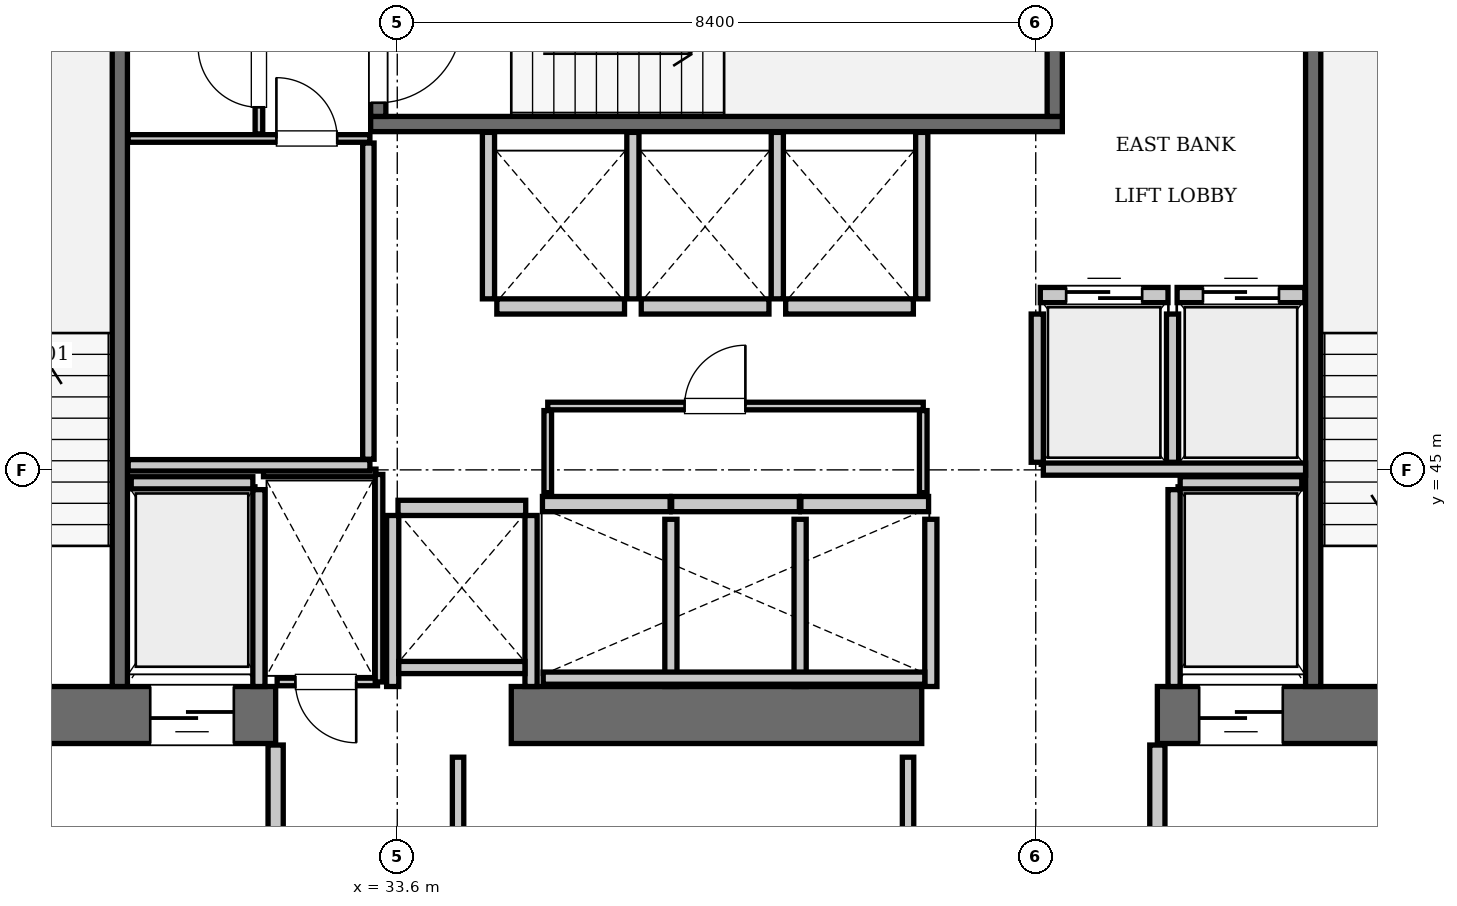
"""IFC4 building model, lengths in metres.
Left out: names, types, materials, properties, quantities, classifications, styles, units other than length and angle.
Written with IfcOpenShell. Run it as: python <this file> out.ifc"""

import sys

from ifc_helpers import new_model, si_unit, direction, frame, frame_2d, origin, place, context, subcontext, project, spatial, rectangle, extrude, element, fill, save


model = new_model("IFC4")
c1 = context("Model", 3, precision=1e-05, world=origin(), true_north=direction((0.0, 1.0)))
c2 = subcontext(c1, "Body", "Model", "MODEL_VIEW")
j1 = project(units=[si_unit("LENGTHUNIT", "METRE"), si_unit("PLANEANGLEUNIT", "RADIAN")], contexts=[c1])
p1 = place(None, origin())
s1 = spatial("IfcSite", under=j1, at=p1, CompositionType="ELEMENT")
p2 = place(p1, origin())
s2 = spatial("IfcBuilding", under=s1, at=p2, CompositionType="ELEMENT")
p3 = place(p2, frame((0.0, 0.0, 219.8)))
s3 = spatial("IfcBuildingStorey", under=s2, at=p3, CompositionType="ELEMENT", Elevation=219.8)
p4 = place(p3, frame((25.2, 41.775, 0.0), z_axis=(0.0, 0.0, 1.0), x_axis=(1.0, 0.0, 0.0)))
e1 = element("IfcWall", 1, at=p4, inside=s3, PredefinedType="SHEAR", context=c2, shape_type="SweptSolid", body=[
    extrude(rectangle(XDim=6.8, YDim=0.75, at=frame_2d((3.4, 0.0))), origin(), (0.0, 0.0, 1.0), 3.85),
])
p5 = place(p4, frame((1.65, 0.0, 0.0)))
e2 = element("IfcOpeningElement", 2, at=p5, cuts=e1, PredefinedType="OPENING", context=c2, shape_type="SweptSolid", body=[
    extrude(rectangle(XDim=1.15, YDim=2.15, at=frame_2d((0.575, 1.075))), frame((0.0, 0.385, 0.0), z_axis=(0.0, -1.0, 0.0), x_axis=(1.0, 0.0, 0.0)), (0.0, 0.0, 1.0), 0.77),
])
p6 = place(p4, frame((5.15, 0.0, 0.0)))
e3 = element("IfcOpeningElement", 3, at=p6, cuts=e1, PredefinedType="OPENING", context=c2, shape_type="SweptSolid", body=[
    extrude(rectangle(XDim=1.1, YDim=2.2, at=frame_2d((0.55, 1.1))), frame((0.0, 0.385, 0.0), z_axis=(0.0, -1.0, 0.0), x_axis=(1.0, 0.0, 0.0)), (0.0, 0.0, 1.0), 0.77),
])
p7 = place(p3, frame((35.1, 41.775, 0.0), z_axis=(0.0, 0.0, 1.0), x_axis=(1.0, 0.0, 0.0)))
e4 = element("IfcWall", 4, at=p7, inside=s3, PredefinedType="SHEAR", context=c2, shape_type="SweptSolid", body=[
    extrude(rectangle(XDim=5.4, YDim=0.75, at=frame_2d((2.7, 0.0))), origin(), (0.0, 0.0, 1.0), 3.85),
])
p8 = place(p3, frame((43.6, 41.775, 0.0), z_axis=(0.0, 0.0, 1.0), x_axis=(1.0, 0.0, 0.0)))
e5 = element("IfcWall", 5, at=p8, inside=s3, PredefinedType="SHEAR", context=c2, shape_type="SweptSolid", body=[
    extrude(rectangle(XDim=6.8, YDim=0.75, at=frame_2d((3.4, 0.0))), origin(), (0.0, 0.0, 1.0), 3.85),
])
p9 = place(p8, frame((3.9, 0.0, 0.0)))
e6 = element("IfcOpeningElement", 6, at=p9, cuts=e5, PredefinedType="OPENING", context=c2, shape_type="SweptSolid", body=[
    extrude(rectangle(XDim=1.15, YDim=2.15, at=frame_2d((0.575, 1.075))), frame((0.0, 0.385, 0.0), z_axis=(0.0, -1.0, 0.0), x_axis=(1.0, 0.0, 0.0)), (0.0, 0.0, 1.0), 0.77),
])
p10 = place(p8, frame((0.55, 0.0, 0.0)))
e7 = element("IfcOpeningElement", 7, at=p10, cuts=e5, PredefinedType="OPENING", context=c2, shape_type="SweptSolid", body=[
    extrude(rectangle(XDim=1.1, YDim=2.2, at=frame_2d((0.55, 1.1))), frame((0.0, 0.385, 0.0), z_axis=(0.0, -1.0, 0.0), x_axis=(1.0, 0.0, 0.0)), (0.0, 0.0, 1.0), 0.77),
])
p11 = place(p3, frame((29.95, 42.15, 0.0), z_axis=(0.0, 0.0, 1.0), x_axis=(0.0, 1.0, 0.0)))
e8 = element("IfcWall", 8, at=p11, inside=s3, PredefinedType="SOLIDWALL", context=c2, shape_type="SweptSolid", body=[
    extrude(rectangle(XDim=9.0, YDim=0.2, at=frame_2d((4.5, 0.0))), origin(), (0.0, 0.0, 1.0), 3.61),
])
p12 = place(p3, frame((33.25, 49.55, 0.0), z_axis=(0.0, 0.0, 1.0), x_axis=(1.0, 0.0, 0.0)))
e9 = element("IfcWall", 9, at=p12, inside=s3, PredefinedType="SOLIDWALL", context=c2, shape_type="SweptSolid", body=[
    extrude(rectangle(XDim=9.1, YDim=0.2, at=frame_2d((4.55, 0.0))), origin(), (0.0, 0.0, 1.0), 3.61),
])
p13 = place(p3, frame((42.25, 49.65, 0.0), z_axis=(0.0, 0.0, 1.0), x_axis=(0.0, 1.0, 0.0)))
e10 = element("IfcWall", 10, at=p13, inside=s3, PredefinedType="SOLIDWALL", context=c2, shape_type="SweptSolid", body=[
    extrude(rectangle(XDim=3.6, YDim=0.2, at=frame_2d((1.8, 0.0))), origin(), (0.0, 0.0, 1.0), 3.61),
])
p14 = place(p3, frame((33.35, 49.65, 0.0), z_axis=(0.0, 0.0, 1.0), x_axis=(0.0, 1.0, 0.0)))
e11 = element("IfcWall", 11, at=p14, inside=s3, PredefinedType="SOLIDWALL", context=c2, shape_type="SweptSolid", body=[
    extrude(rectangle(XDim=3.6, YDim=0.2, at=frame_2d((1.8, 0.0))), origin(), (0.0, 0.0, 1.0), 3.61),
])
p15 = place(p14, frame((0.18, 0.0, 0.0)))
e12 = element("IfcOpeningElement", 12, at=p15, cuts=e11, PredefinedType="OPENING", context=c2, shape_type="SweptSolid", body=[
    extrude(rectangle(XDim=1.1, YDim=2.15, at=frame_2d((0.55, 1.075))), frame((0.0, 0.11, 0.0), z_axis=(0.0, -1.0, 0.0), x_axis=(1.0, 0.0, 0.0)), (0.0, 0.0, 1.0), 0.22),
])
p16 = place(p3, frame((45.65, 42.15, 0.0), z_axis=(0.0, 0.0, 1.0), x_axis=(0.0, 1.0, 0.0)))
e13 = element("IfcWall", 13, at=p16, inside=s3, PredefinedType="SOLIDWALL", context=c2, shape_type="SweptSolid", body=[
    extrude(rectangle(XDim=9.0, YDim=0.2, at=frame_2d((4.5, 0.0))), origin(), (0.0, 0.0, 1.0), 3.61),
])
p17 = place(p3, frame((42.06, 47.3, 0.0), z_axis=(0.0, 0.0, 1.0), x_axis=(1.0, 0.0, 0.0)))
e14 = element("IfcWall", 14, at=p17, inside=s3, PredefinedType="SOLIDWALL", context=c2, shape_type="SweptSolid", body=[
    extrude(rectangle(XDim=1.68, YDim=0.2, at=frame_2d((0.84, 0.0))), origin(), (0.0, 0.0, 1.0), 3.61),
])
p18 = place(p17, frame((0.34, 0.0, 0.0)))
e15 = element("IfcOpeningElement", 15, at=p18, cuts=e14, PredefinedType="OPENING", context=c2, shape_type="SweptSolid", body=[
    extrude(rectangle(XDim=1.0, YDim=2.15, at=frame_2d((0.5, 1.075))), frame((0.0, 0.11, 0.0), z_axis=(0.0, -1.0, 0.0), x_axis=(1.0, 0.0, 0.0)), (0.0, 0.0, 1.0), 0.22),
])
p19 = place(p3, frame((43.86, 47.3, 0.0), z_axis=(0.0, 0.0, 1.0), x_axis=(1.0, 0.0, 0.0)))
e16 = element("IfcWall", 16, at=p19, inside=s3, PredefinedType="SOLIDWALL", context=c2, shape_type="SweptSolid", body=[
    extrude(rectangle(XDim=1.68, YDim=0.2, at=frame_2d((0.84, 0.0))), origin(), (0.0, 0.0, 1.0), 3.61),
])
p20 = place(p19, frame((0.34, 0.0, 0.0)))
e17 = element("IfcOpeningElement", 17, at=p20, cuts=e16, PredefinedType="OPENING", context=c2, shape_type="SweptSolid", body=[
    extrude(rectangle(XDim=1.0, YDim=2.15, at=frame_2d((0.5, 1.075))), frame((0.0, 0.11, 0.0), z_axis=(0.0, -1.0, 0.0), x_axis=(1.0, 0.0, 0.0)), (0.0, 0.0, 1.0), 0.22),
])
for number, where, z_axis, x_axis in (
    (18, (35.51, 44.55, 0.0), (0.0, 0.0, 1.0), (1.0, 0.0, 0.0)),
    (19, (37.21, 44.55, 0.0), (0.0, 0.0, 1.0), (1.0, 0.0, 0.0)),
):
    element("IfcWall", number, at=place(p3, frame(where, z_axis=z_axis, x_axis=x_axis)), inside=s3, PredefinedType="SOLIDWALL", context=c2, shape_type="SweptSolid", body=[
        extrude(rectangle(XDim=1.68, YDim=0.2, at=frame_2d((0.84, 0.0))), origin(), (0.0, 0.0, 1.0), 3.61),
    ])
for number, where, z_axis, x_axis in (
    (20, (38.91, 44.55, 0.0), (0.0, 0.0, 1.0), (1.0, 0.0, 0.0)),
    (21, (34.91, 47.15, 0.0), (0.0, 0.0, 1.0), (1.0, 0.0, 0.0)),
):
    element("IfcWall", number, at=place(p3, frame(where, z_axis=z_axis, x_axis=x_axis)), inside=s3, PredefinedType="SOLIDWALL", context=c2, shape_type="SweptSolid", body=[
        extrude(rectangle(XDim=1.68, YDim=0.2, at=frame_2d((0.84, 0.0))), origin(), (0.0, 0.0, 1.0), 3.61),
    ])
for number, where, z_axis, x_axis in (
    (22, (36.81, 47.15, 0.0), (0.0, 0.0, 1.0), (1.0, 0.0, 0.0)),
    (23, (38.71, 47.15, 0.0), (0.0, 0.0, 1.0), (1.0, 0.0, 0.0)),
    (24, (33.61, 44.5, 0.0), (0.0, 0.0, 1.0), (1.0, 0.0, 0.0)),
):
    element("IfcWall", number, at=place(p3, frame(where, z_axis=z_axis, x_axis=x_axis)), inside=s3, PredefinedType="SOLIDWALL", context=c2, shape_type="SweptSolid", body=[
        extrude(rectangle(XDim=1.68, YDim=0.2, at=frame_2d((0.84, 0.0))), origin(), (0.0, 0.0, 1.0), 3.61),
    ])
p21 = place(p3, frame((30.1, 44.83, 0.0), z_axis=(0.0, 0.0, 1.0), x_axis=(1.0, 0.0, 0.0)))
e25 = element("IfcWall", 25, at=p21, inside=s3, PredefinedType="SOLIDWALL", context=c2, shape_type="SweptSolid", body=[
    extrude(rectangle(XDim=1.6, YDim=0.16, at=frame_2d((0.8, 0.0))), origin(), (0.0, 0.0, 1.0), 3.61),
])
p22 = place(p3, frame((31.78, 42.15, 0.0), z_axis=(0.0, 0.0, 1.0), x_axis=(0.0, 1.0, 0.0)))
e26 = element("IfcWall", 26, at=p22, inside=s3, PredefinedType="SOLIDWALL", context=c2, shape_type="SweptSolid", body=[
    extrude(rectangle(XDim=2.59, YDim=0.16, at=frame_2d((1.295, 0.0))), origin(), (0.0, 0.0, 1.0), 3.61),
])
p23 = place(p3, frame((43.9, 44.83, 0.0), z_axis=(0.0, 0.0, 1.0), x_axis=(1.0, 0.0, 0.0)))
e27 = element("IfcWall", 27, at=p23, inside=s3, PredefinedType="SOLIDWALL", context=c2, shape_type="SweptSolid", body=[
    extrude(rectangle(XDim=1.6, YDim=0.16, at=frame_2d((0.8, 0.0))), origin(), (0.0, 0.0, 1.0), 3.61),
])
p24 = place(p3, frame((43.82, 42.15, 0.0), z_axis=(0.0, 0.0, 1.0), x_axis=(0.0, 1.0, 0.0)))
e28 = element("IfcWall", 28, at=p24, inside=s3, PredefinedType="SOLIDWALL", context=c2, shape_type="SweptSolid", body=[
    extrude(rectangle(XDim=2.59, YDim=0.16, at=frame_2d((1.295, 0.0))), origin(), (0.0, 0.0, 1.0), 3.61),
])
for number, where, z_axis, x_axis in (
    (29, (42.02, 45.1, 0.0), (0.0, 0.0, 1.0), (0.0, 1.0, 0.0)),
    (30, (43.8, 45.1, 0.0), (0.0, 0.0, 1.0), (0.0, 1.0, 0.0)),
):
    element("IfcWall", number, at=place(p3, frame(where, z_axis=z_axis, x_axis=x_axis)), inside=s3, PredefinedType="SOLIDWALL", context=c2, shape_type="SweptSolid", body=[
        extrude(rectangle(XDim=1.95, YDim=0.16, at=frame_2d((0.975, 0.0))), origin(), (0.0, 0.0, 1.0), 3.61),
    ])
p25 = place(p3, frame((42.1, 45.01, 0.0), z_axis=(0.0, 0.0, 1.0), x_axis=(1.0, 0.0, 0.0)))
e31 = element("IfcWall", 31, at=p25, inside=s3, PredefinedType="SOLIDWALL", context=c2, shape_type="SweptSolid", body=[
    extrude(rectangle(XDim=3.45, YDim=0.16, at=frame_2d((1.725, 0.0))), origin(), (0.0, 0.0, 1.0), 3.61),
])
for number, where, z_axis, x_axis in (
    (32, (37.2, 42.15, 0.0), (0.0, 0.0, 1.0), (0.0, 1.0, 0.0)),
    (33, (38.9, 42.15, 0.0), (0.0, 0.0, 1.0), (0.0, 1.0, 0.0)),
    (34, (40.62, 42.15, 0.0), (0.0, 0.0, 1.0), (0.0, 1.0, 0.0)),
):
    element("IfcWall", number, at=place(p3, frame(where, z_axis=z_axis, x_axis=x_axis)), inside=s3, PredefinedType="SOLIDWALL", context=c2, shape_type="SweptSolid", body=[
        extrude(rectangle(XDim=2.2, YDim=0.16, at=frame_2d((1.1, 0.0))), origin(), (0.0, 0.0, 1.0), 3.61),
    ])
p26 = place(p3, frame((35.52, 42.26, 0.0), z_axis=(0.0, 0.0, 1.0), x_axis=(1.0, 0.0, 0.0)))
e35 = element("IfcWall", 35, at=p26, inside=s3, PredefinedType="SOLIDWALL", context=c2, shape_type="SweptSolid", body=[
    extrude(rectangle(XDim=5.02, YDim=0.16, at=frame_2d((2.51, 0.0))), origin(), (0.0, 0.0, 1.0), 3.61),
])
for number, where, z_axis, x_axis in (
    (36, (34.8, 47.25, 0.0), (0.0, 0.0, 1.0), (0.0, 1.0, 0.0)),
    (37, (36.7, 47.25, 0.0), (0.0, 0.0, 1.0), (0.0, 1.0, 0.0)),
    (38, (38.6, 47.25, 0.0), (0.0, 0.0, 1.0), (0.0, 1.0, 0.0)),
    (39, (40.5, 47.25, 0.0), (0.0, 0.0, 1.0), (0.0, 1.0, 0.0)),
):
    element("IfcWall", number, at=place(p3, frame(where, z_axis=z_axis, x_axis=x_axis)), inside=s3, PredefinedType="SOLIDWALL", context=c2, shape_type="SweptSolid", body=[
        extrude(rectangle(XDim=2.19, YDim=0.16, at=frame_2d((1.095, 0.0))), origin(), (0.0, 0.0, 1.0), 3.61),
    ])
for number, where, z_axis, x_axis in (
    (40, (33.54, 42.15, 0.0), (0.0, 0.0, 1.0), (0.0, 1.0, 0.0)),
    (41, (35.36, 42.15, 0.0), (0.0, 0.0, 1.0), (0.0, 1.0, 0.0)),
):
    element("IfcWall", number, at=place(p3, frame(where, z_axis=z_axis, x_axis=x_axis)), inside=s3, PredefinedType="SOLIDWALL", context=c2, shape_type="SweptSolid", body=[
        extrude(rectangle(XDim=2.25, YDim=0.16, at=frame_2d((1.125, 0.0))), origin(), (0.0, 0.0, 1.0), 3.61),
    ])
p27 = place(p3, frame((33.62, 42.4, 0.0), z_axis=(0.0, 0.0, 1.0), x_axis=(1.0, 0.0, 0.0)))
e42 = element("IfcWall", 42, at=p27, inside=s3, PredefinedType="SOLIDWALL", context=c2, shape_type="SweptSolid", body=[
    extrude(rectangle(XDim=1.66, YDim=0.16, at=frame_2d((0.83, 0.0))), origin(), (0.0, 0.0, 1.0), 3.61),
])
for number, where, z_axis, x_axis in (
    (43, (32.0, 38.31, 0.0), (0.0, 0.0, 1.0), (0.0, 1.0, 0.0)),
    (44, (43.6, 38.31, 0.0), (0.0, 0.0, 1.0), (0.0, 1.0, 0.0)),
):
    element("IfcWall", number, at=place(p3, frame(where, z_axis=z_axis, x_axis=x_axis)), inside=s3, PredefinedType="PARTITIONING", context=c2, shape_type="SweptSolid", body=[
        extrude(rectangle(XDim=3.07, YDim=0.2, at=frame_2d((1.535, 0.0))), origin(), (0.0, 0.0, 1.0), 3.61),
    ])
p28 = place(p3, frame((32.02, 42.21, 0.0), z_axis=(0.0, 0.0, 1.0), x_axis=(1.0, 0.0, 0.0)))
e45 = element("IfcWall", 45, at=p28, inside=s3, PredefinedType="PARTITIONING", context=c2, shape_type="SweptSolid", body=[
    extrude(rectangle(XDim=1.32, YDim=0.1, at=frame_2d((0.66, 0.0))), origin(), (0.0, 0.0, 1.0), 3.61),
])
p29 = place(p28, frame((0.24, 0.0, 0.0)))
e46 = element("IfcOpeningElement", 46, at=p29, cuts=e45, PredefinedType="OPENING", context=c2, shape_type="SweptSolid", body=[
    extrude(rectangle(XDim=0.8, YDim=2.05, at=frame_2d((0.4, 1.025))), frame((0.0, 0.06, 0.0), z_axis=(0.0, -1.0, 0.0), x_axis=(1.0, 0.0, 0.0)), (0.0, 0.0, 1.0), 0.12),
])
p30 = place(p3, frame((31.84, 44.96, 0.0), z_axis=(0.0, 0.0, 1.0), x_axis=(1.0, 0.0, 0.0)))
e47 = element("IfcWall", 47, at=p30, inside=s3, PredefinedType="PARTITIONING", context=c2, shape_type="SweptSolid", body=[
    extrude(rectangle(XDim=1.48, YDim=0.1, at=frame_2d((0.74, 0.0))), origin(), (0.0, 0.0, 1.0), 3.61),
])
p31 = place(p3, frame((33.36, 42.21, 0.0), z_axis=(0.0, 0.0, 1.0), x_axis=(0.0, 1.0, 0.0)))
e48 = element("IfcWall", 48, at=p31, inside=s3, PredefinedType="PARTITIONING", context=c2, shape_type="SweptSolid", body=[
    extrude(rectangle(XDim=2.73, YDim=0.1, at=frame_2d((1.365, 0.0))), origin(), (0.0, 0.0, 1.0), 3.61),
])
p32 = place(p3, frame((35.58, 45.84, 0.0), z_axis=(0.0, 0.0, 1.0), x_axis=(1.0, 0.0, 0.0)))
e49 = element("IfcWall", 49, at=p32, inside=s3, PredefinedType="PARTITIONING", context=c2, shape_type="SweptSolid", body=[
    extrude(rectangle(XDim=4.94, YDim=0.1, at=frame_2d((2.47, 0.0))), origin(), (0.0, 0.0, 1.0), 3.61),
])
p33 = place(p32, frame((1.8, 0.0, 0.0)))
e50 = element("IfcOpeningElement", 50, at=p33, cuts=e49, PredefinedType="OPENING", context=c2, shape_type="SweptSolid", body=[
    extrude(rectangle(XDim=0.8, YDim=2.05, at=frame_2d((0.4, 1.025))), frame((0.0, 0.06, 0.0), z_axis=(0.0, -1.0, 0.0), x_axis=(1.0, 0.0, 0.0)), (0.0, 0.0, 1.0), 0.12),
])
for number, where, z_axis, x_axis in (
    (51, (35.58, 44.7, 0.0), (0.0, 0.0, 1.0), (0.0, 1.0, 0.0)),
    (52, (40.52, 44.7, 0.0), (0.0, 0.0, 1.0), (0.0, 1.0, 0.0)),
):
    element("IfcWall", number, at=place(p3, frame(where, z_axis=z_axis, x_axis=x_axis)), inside=s3, PredefinedType="PARTITIONING", context=c2, shape_type="SweptSolid", body=[
        extrude(rectangle(XDim=1.08, YDim=0.1, at=frame_2d((0.54, 0.0))), origin(), (0.0, 0.0, 1.0), 3.61),
    ])
p34 = place(p3, frame((30.06, 45.06, 0.0), z_axis=(0.0, 0.0, 1.0), x_axis=(1.0, 0.0, 0.0)))
e53 = element("IfcWall", 53, at=p34, inside=s3, PredefinedType="PARTITIONING", context=c2, shape_type="SweptSolid", body=[
    extrude(rectangle(XDim=3.18, YDim=0.15, at=frame_2d((1.59, 0.0))), origin(), (0.0, 0.0, 1.0), 3.61),
])
p35 = place(p3, frame((33.22, 45.14, 0.0), z_axis=(0.0, 0.0, 1.0), x_axis=(0.0, 1.0, 0.0)))
e54 = element("IfcWall", 54, at=p35, inside=s3, PredefinedType="PARTITIONING", context=c2, shape_type="SweptSolid", body=[
    extrude(rectangle(XDim=4.16, YDim=0.15, at=frame_2d((2.08, 0.0))), origin(), (0.0, 0.0, 1.0), 3.61),
])
p36 = place(p3, frame((30.06, 49.36, 0.0), z_axis=(0.0, 0.0, 1.0), x_axis=(1.0, 0.0, 0.0)))
e55 = element("IfcWall", 55, at=p36, inside=s3, PredefinedType="PARTITIONING", context=c2, shape_type="SweptSolid", body=[
    extrude(rectangle(XDim=3.18, YDim=0.1, at=frame_2d((1.59, 0.0))), origin(), (0.0, 0.0, 1.0), 3.61),
])
p37 = place(p36, frame((1.95, 0.0, 0.0)))
e56 = element("IfcOpeningElement", 56, at=p37, cuts=e55, PredefinedType="OPENING", context=c2, shape_type="SweptSolid", body=[
    extrude(rectangle(XDim=0.8, YDim=2.05, at=frame_2d((0.4, 1.025))), frame((0.0, 0.06, 0.0), z_axis=(0.0, -1.0, 0.0), x_axis=(1.0, 0.0, 0.0)), (0.0, 0.0, 1.0), 0.12),
])
p38 = place(p3, frame((31.78, 49.42, 0.0), z_axis=(0.0, 0.0, 1.0), x_axis=(0.0, 1.0, 0.0)))
e57 = element("IfcWall", 57, at=p38, inside=s3, PredefinedType="PARTITIONING", context=c2, shape_type="SweptSolid", body=[
    extrude(rectangle(XDim=1.68, YDim=0.1, at=frame_2d((0.84, 0.0))), origin(), (0.0, 0.0, 1.0), 3.61),
])
p39 = place(p38, frame((0.35, 0.0, 0.0)))
e58 = element("IfcOpeningElement", 58, at=p39, cuts=e57, PredefinedType="OPENING", context=c2, shape_type="SweptSolid", body=[
    extrude(rectangle(XDim=0.8, YDim=2.05, at=frame_2d((0.4, 1.025))), frame((0.0, 0.06, 0.0), z_axis=(0.0, -1.0, 0.0), x_axis=(1.0, 0.0, 0.0)), (0.0, 0.0, 1.0), 0.12),
])
for number, where, z_axis, x_axis in (
    (59, (34.4, 38.38, 0.0), (0.0, 0.0, 1.0), (0.0, 1.0, 0.0)),
    (60, (40.32, 38.38, 0.0), (0.0, 0.0, 1.0), (0.0, 1.0, 0.0)),
):
    element("IfcWall", number, at=place(p3, frame(where, z_axis=z_axis, x_axis=x_axis)), inside=s3, PredefinedType="PARTITIONING", context=c2, shape_type="SweptSolid", body=[
        extrude(rectangle(XDim=2.84, YDim=0.15, at=frame_2d((1.42, 0.0))), origin(), (0.0, 0.0, 1.0), 3.61),
    ])
p40 = place(p15, frame((1.1, 0.0, 0.0), z_axis=(0.0, 0.0, 1.0), x_axis=(-1.0, 0.0, 0.0)))
e61 = element("IfcDoor", 61, at=p40, inside=s3, OperationType="SINGLE_SWING_LEFT", PredefinedType="DOOR", context=c2, shape_type="SweptSolid", body=[
    extrude(rectangle(XDim=1.1, YDim=2.15, at=frame_2d((0.55, 1.075))), frame((0.0, 0.025, 0.0), z_axis=(0.0, -1.0, 0.0), x_axis=(1.0, 0.0, 0.0)), (0.0, 0.0, 1.0), 0.05),
])
fill(e12, e61)
p41 = place(p18, origin())
e62 = element("IfcDoor", 62, at=p41, inside=s3, OperationType="SLIDING_TO_LEFT", PredefinedType="DOOR", context=c2, shape_type="SweptSolid", body=[
    extrude(rectangle(XDim=1.0, YDim=2.15, at=frame_2d((0.5, 1.075))), frame((0.0, 0.025, 0.0), z_axis=(0.0, -1.0, 0.0), x_axis=(1.0, 0.0, 0.0)), (0.0, 0.0, 1.0), 0.05),
])
fill(e15, e62)
p42 = place(p20, origin())
e63 = element("IfcDoor", 63, at=p42, inside=s3, OperationType="SLIDING_TO_LEFT", PredefinedType="DOOR", context=c2, shape_type="SweptSolid", body=[
    extrude(rectangle(XDim=1.0, YDim=2.15, at=frame_2d((0.5, 1.075))), frame((0.0, 0.025, 0.0), z_axis=(0.0, -1.0, 0.0), x_axis=(1.0, 0.0, 0.0)), (0.0, 0.0, 1.0), 0.05),
])
fill(e17, e63)
p43 = place(p6, frame((1.1, 0.0, 0.0), z_axis=(0.0, 0.0, 1.0), x_axis=(-1.0, 0.0, 0.0)))
e64 = element("IfcDoor", 64, at=p43, inside=s3, OperationType="SLIDING_TO_LEFT", PredefinedType="DOOR", context=c2, shape_type="SweptSolid", body=[
    extrude(rectangle(XDim=1.1, YDim=2.2, at=frame_2d((0.55, 1.1))), frame((0.0, 0.025, 0.0), z_axis=(0.0, -1.0, 0.0), x_axis=(1.0, 0.0, 0.0)), (0.0, 0.0, 1.0), 0.05),
])
fill(e3, e64)
p44 = place(p10, frame((1.1, 0.0, 0.0), z_axis=(0.0, 0.0, 1.0), x_axis=(-1.0, 0.0, 0.0)))
e65 = element("IfcDoor", 65, at=p44, inside=s3, OperationType="SLIDING_TO_LEFT", PredefinedType="DOOR", context=c2, shape_type="SweptSolid", body=[
    extrude(rectangle(XDim=1.1, YDim=2.2, at=frame_2d((0.55, 1.1))), frame((0.0, 0.025, 0.0), z_axis=(0.0, -1.0, 0.0), x_axis=(1.0, 0.0, 0.0)), (0.0, 0.0, 1.0), 0.05),
])
fill(e7, e65)
p45 = place(p29, frame((0.8, 0.0, 0.0), z_axis=(0.0, 0.0, 1.0), x_axis=(-1.0, 0.0, 0.0)))
e66 = element("IfcDoor", 66, at=p45, inside=s3, OperationType="SINGLE_SWING_LEFT", PredefinedType="DOOR", context=c2, shape_type="SweptSolid", body=[
    extrude(rectangle(XDim=0.8, YDim=2.05, at=frame_2d((0.4, 1.025))), frame((0.0, 0.025, 0.0), z_axis=(0.0, -1.0, 0.0), x_axis=(1.0, 0.0, 0.0)), (0.0, 0.0, 1.0), 0.05),
])
fill(e46, e66)
p46 = place(p33, origin())
e67 = element("IfcDoor", 67, at=p46, inside=s3, OperationType="SINGLE_SWING_RIGHT", PredefinedType="DOOR", context=c2, shape_type="SweptSolid", body=[
    extrude(rectangle(XDim=0.8, YDim=2.05, at=frame_2d((0.4, 1.025))), frame((0.0, 0.025, 0.0), z_axis=(0.0, -1.0, 0.0), x_axis=(1.0, 0.0, 0.0)), (0.0, 0.0, 1.0), 0.05),
])
fill(e50, e67)
p47 = place(p37, origin())
e68 = element("IfcDoor", 68, at=p47, inside=s3, OperationType="SINGLE_SWING_LEFT", PredefinedType="DOOR", context=c2, shape_type="SweptSolid", body=[
    extrude(rectangle(XDim=0.8, YDim=2.05, at=frame_2d((0.4, 1.025))), frame((0.0, 0.025, 0.0), z_axis=(0.0, -1.0, 0.0), x_axis=(1.0, 0.0, 0.0)), (0.0, 0.0, 1.0), 0.05),
])
fill(e56, e68)
p48 = place(p39, origin())
e69 = element("IfcDoor", 69, at=p48, inside=s3, OperationType="SINGLE_SWING_RIGHT", PredefinedType="DOOR", context=c2, shape_type="SweptSolid", body=[
    extrude(rectangle(XDim=0.8, YDim=2.05, at=frame_2d((0.4, 1.025))), frame((0.0, 0.025, 0.0), z_axis=(0.0, -1.0, 0.0), x_axis=(1.0, 0.0, 0.0)), (0.0, 0.0, 1.0), 0.05),
])
fill(e58, e69)
save(model, sys.argv[1])
